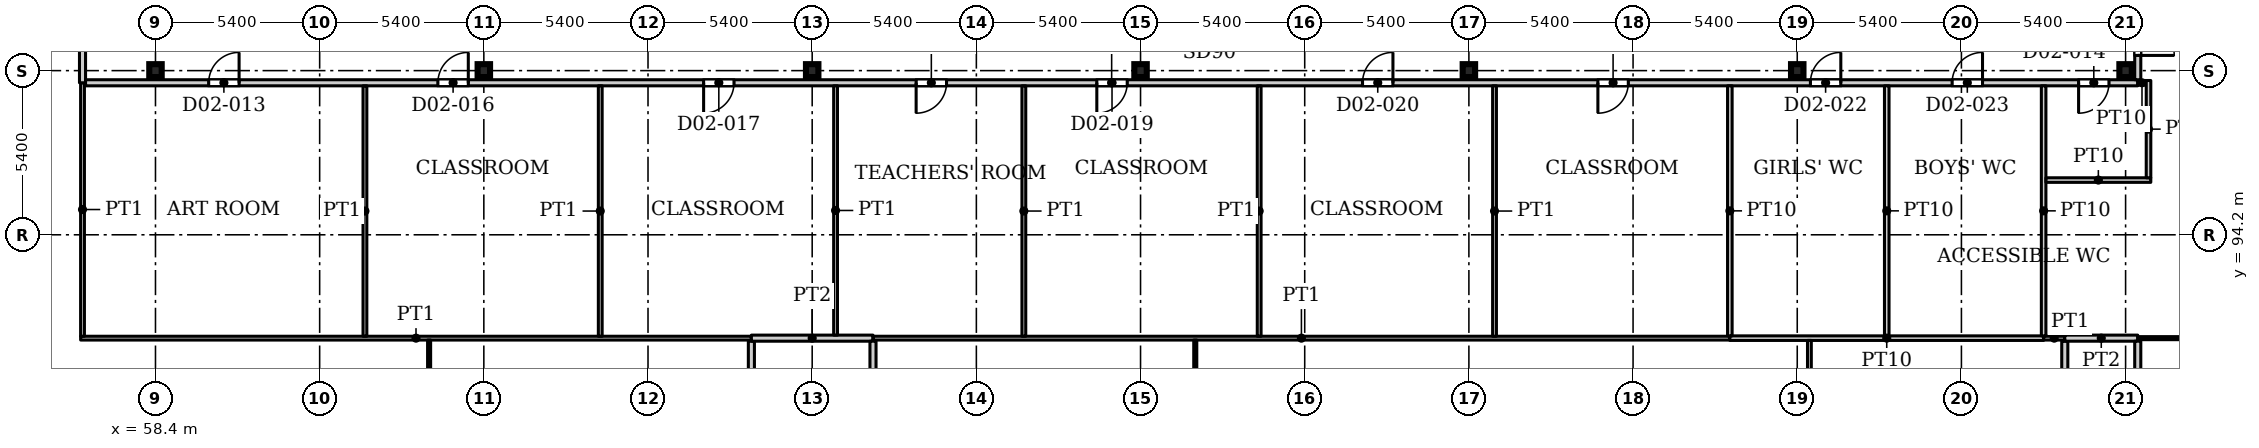
"""IFC4 building model, lengths in metres.
Left out: names, types, materials, properties, quantities, classifications, styles, units other than length and angle.
Written with IfcOpenShell. Run it as: python <this file> out.ifc"""

import sys

from ifc_helpers import new_model, si_unit, direction, frame, frame_2d, origin, origin_2d, place, context, subcontext, project, spatial, rectangle, i_section, extrude, source, transform, mapped, element, fill, save


model = new_model("IFC4")
c1 = context("Model", 3, precision=1e-05, world=origin(), true_north=direction((0.0, 1.0)))
c2 = subcontext(c1, "Body", "Model", "MODEL_VIEW")
j1 = project(units=[si_unit("LENGTHUNIT", "METRE"), si_unit("PLANEANGLEUNIT", "RADIAN")], contexts=[c1])
p1 = place(None, origin())
s1 = spatial("IfcSite", under=j1, at=p1, CompositionType="ELEMENT")
p2 = place(p1, origin())
s2 = spatial("IfcBuilding", under=s1, at=p2, CompositionType="ELEMENT")
p3 = place(p2, frame((0.0, 0.0, 12.5)))
s3 = spatial("IfcBuildingStorey", under=s2, at=p3, CompositionType="ELEMENT", Elevation=12.5)
for number, where, z_axis, x_axis in (
    (1, (58.4, 99.6, 0.0), (0.0, 0.0, 1.0), (1.0, 0.0, 0.0)),
    (2, (69.2, 99.6, 0.0), (0.0, 0.0, 1.0), (1.0, 0.0, 0.0)),
    (3, (80.0, 99.6, 0.0), (0.0, 0.0, 1.0), (1.0, 0.0, 0.0)),
    (4, (90.8, 99.6, 0.0), (0.0, 0.0, 1.0), (1.0, 0.0, 0.0)),
    (5, (101.6, 99.6, 0.0), (0.0, 0.0, 1.0), (1.0, 0.0, 0.0)),
    (6, (112.4, 99.6, 0.0), (0.0, 0.0, 1.0), (1.0, 0.0, 0.0)),
    (7, (123.2, 99.6, 0.0), (0.0, 0.0, 1.0), (1.0, 0.0, 0.0)),
):
    element("IfcColumn", number, at=place(p3, frame(where, z_axis=z_axis, x_axis=x_axis)), inside=s3, PredefinedType="COLUMN", context=c2, shape_type="SweptSolid", body=[
        extrude(i_section(OverallWidth=0.409, OverallDepth=0.425, WebThickness=0.033, FlangeThickness=0.052, FilletRadius=0.013, at=origin_2d()), origin(), (0.0, 0.0, 1.0), 4.5),
    ])
p4 = place(p3, frame((55.938, 90.8, 0.0), z_axis=(0.0, 0.0, 1.0), x_axis=(1.0, 0.0, 0.0)))
e8 = element("IfcWall", 8, at=p4, inside=s3, PredefinedType="PARTITIONING", context=c2, shape_type="SweptSolid", body=[
    extrude(rectangle(XDim=22.062, YDim=0.125, at=frame_2d((11.031, 0.0))), origin(), (0.0, 0.0, 1.0), 4.18),
])
p5 = place(p3, frame((56.0, 90.862, 0.0), z_axis=(0.0, 0.0, 1.0), x_axis=(0.0, 1.0, 0.0)))
e9 = element("IfcWall", 9, at=p5, inside=s3, PredefinedType="PARTITIONING", context=c2, shape_type="SweptSolid", body=[
    extrude(rectangle(XDim=8.338, YDim=0.125, at=frame_2d((4.169, 0.0))), origin(), (0.0, 0.0, 1.0), 4.18),
])
p6 = place(p3, frame((56.0, 99.2, 0.0), z_axis=(0.0, 0.0, 1.0), x_axis=(0.0, 1.0, 0.0)))
e10 = element("IfcWall", 10, at=p6, inside=s3, PredefinedType="PARTITIONING", context=c2, shape_type="SweptSolid", body=[
    extrude(rectangle(XDim=2.4, YDim=0.2, at=frame_2d((1.2, 0.0))), origin(), (0.0, 0.0, 1.0), 4.18),
])
p7 = place(p3, frame((56.1, 99.2, 0.0), z_axis=(0.0, 0.0, 1.0), x_axis=(1.0, 0.0, 0.0)))
e11 = element("IfcWall", 11, at=p7, inside=s3, PredefinedType="PARTITIONING", context=c2, shape_type="SweptSolid", body=[
    extrude(rectangle(XDim=67.5, YDim=0.2, at=frame_2d((33.75, 0.0))), origin(), (0.0, 0.0, 1.0), 4.18),
])
p8 = place(p7, frame((4.05, 0.0, 0.0)))
e12 = element("IfcOpeningElement", 12, at=p8, cuts=e11, PredefinedType="OPENING", context=c2, shape_type="SweptSolid", body=[
    extrude(rectangle(XDim=1.0, YDim=2.1, at=frame_2d((0.5, 1.05))), frame((0.0, 0.11, 0.0), z_axis=(0.0, -1.0, 0.0), x_axis=(1.0, 0.0, 0.0)), (0.0, 0.0, 1.0), 0.22),
])
p9 = place(p7, frame((65.554, 0.0, 0.0)))
e13 = element("IfcOpeningElement", 13, at=p9, cuts=e11, PredefinedType="OPENING", context=c2, shape_type="SweptSolid", body=[
    extrude(rectangle(XDim=1.0, YDim=2.1, at=frame_2d((0.5, 1.05))), frame((0.0, 0.11, 0.0), z_axis=(0.0, -1.0, 0.0), x_axis=(1.0, 0.0, 0.0)), (0.0, 0.0, 1.0), 0.22),
])
p10 = place(p7, frame((11.589, 0.0, 0.0)))
e14 = element("IfcOpeningElement", 14, at=p10, cuts=e11, PredefinedType="OPENING", context=c2, shape_type="SweptSolid", body=[
    extrude(rectangle(XDim=1.0, YDim=2.1, at=frame_2d((0.5, 1.05))), frame((0.0, 0.11, 0.0), z_axis=(0.0, -1.0, 0.0), x_axis=(1.0, 0.0, 0.0)), (0.0, 0.0, 1.0), 0.22),
])
p11 = place(p7, frame((20.329, 0.0, 0.0)))
e15 = element("IfcOpeningElement", 15, at=p11, cuts=e11, PredefinedType="OPENING", context=c2, shape_type="SweptSolid", body=[
    extrude(rectangle(XDim=1.0, YDim=2.1, at=frame_2d((0.5, 1.05))), frame((0.0, 0.11, 0.0), z_axis=(0.0, -1.0, 0.0), x_axis=(1.0, 0.0, 0.0)), (0.0, 0.0, 1.0), 0.22),
])
p12 = place(p7, frame((27.319, 0.0, 0.0)))
e16 = element("IfcOpeningElement", 16, at=p12, cuts=e11, PredefinedType="OPENING", context=c2, shape_type="SweptSolid", body=[
    extrude(rectangle(XDim=1.0, YDim=2.1, at=frame_2d((0.5, 1.05))), frame((0.0, 0.11, 0.0), z_axis=(0.0, -1.0, 0.0), x_axis=(1.0, 0.0, 0.0)), (0.0, 0.0, 1.0), 0.22),
])
p13 = place(p7, frame((33.262, 0.0, 0.0)))
e17 = element("IfcOpeningElement", 17, at=p13, cuts=e11, PredefinedType="OPENING", context=c2, shape_type="SweptSolid", body=[
    extrude(rectangle(XDim=1.0, YDim=2.1, at=frame_2d((0.5, 1.05))), frame((0.0, 0.11, 0.0), z_axis=(0.0, -1.0, 0.0), x_axis=(1.0, 0.0, 0.0)), (0.0, 0.0, 1.0), 0.22),
])
p14 = place(p7, frame((42.002, 0.0, 0.0)))
e18 = element("IfcOpeningElement", 18, at=p14, cuts=e11, PredefinedType="OPENING", context=c2, shape_type="SweptSolid", body=[
    extrude(rectangle(XDim=1.0, YDim=2.1, at=frame_2d((0.5, 1.05))), frame((0.0, 0.11, 0.0), z_axis=(0.0, -1.0, 0.0), x_axis=(1.0, 0.0, 0.0)), (0.0, 0.0, 1.0), 0.22),
])
p15 = place(p7, frame((49.743, 0.0, 0.0)))
e19 = element("IfcOpeningElement", 19, at=p15, cuts=e11, PredefinedType="OPENING", context=c2, shape_type="SweptSolid", body=[
    extrude(rectangle(XDim=1.0, YDim=2.1, at=frame_2d((0.5, 1.05))), frame((0.0, 0.11, 0.0), z_axis=(0.0, -1.0, 0.0), x_axis=(1.0, 0.0, 0.0)), (0.0, 0.0, 1.0), 0.22),
])
p16 = place(p7, frame((56.733, 0.0, 0.0)))
e20 = element("IfcOpeningElement", 20, at=p16, cuts=e11, PredefinedType="OPENING", context=c2, shape_type="SweptSolid", body=[
    extrude(rectangle(XDim=1.0, YDim=2.1, at=frame_2d((0.5, 1.05))), frame((0.0, 0.11, 0.0), z_axis=(0.0, -1.0, 0.0), x_axis=(1.0, 0.0, 0.0)), (0.0, 0.0, 1.0), 0.22),
])
p17 = place(p7, frame((61.394, 0.0, 0.0)))
e21 = element("IfcOpeningElement", 21, at=p17, cuts=e11, PredefinedType="OPENING", context=c2, shape_type="SweptSolid", body=[
    extrude(rectangle(XDim=1.0, YDim=2.1, at=frame_2d((0.5, 1.05))), frame((0.0, 0.11, 0.0), z_axis=(0.0, -1.0, 0.0), x_axis=(1.0, 0.0, 0.0)), (0.0, 0.0, 1.0), 0.22),
])
p18 = place(p3, frame((65.289, 90.862, 0.0), z_axis=(0.0, 0.0, 1.0), x_axis=(0.0, 1.0, 0.0)))
e22 = element("IfcWall", 22, at=p18, inside=s3, PredefinedType="PARTITIONING", context=c2, shape_type="SweptSolid", body=[
    extrude(rectangle(XDim=8.238, YDim=0.125, at=frame_2d((4.119, 0.0))), origin(), (0.0, 0.0, 1.0), 4.18),
])
p19 = place(p3, frame((67.4, 69.0, 0.0), z_axis=(0.0, 0.0, 1.0), x_axis=(0.0, 1.0, 0.0)))
e23 = element("IfcWall", 23, at=p19, inside=s3, PredefinedType="PARTITIONING", context=c2, shape_type="SweptSolid", body=[
    extrude(rectangle(XDim=21.738, YDim=0.1, at=frame_2d((10.869, 0.0))), origin(), (0.0, 0.0, 1.0), 4.18),
])
p20 = place(p3, frame((73.029, 90.862, 0.0), z_axis=(0.0, 0.0, 1.0), x_axis=(0.0, 1.0, 0.0)))
e24 = element("IfcWall", 24, at=p20, inside=s3, PredefinedType="PARTITIONING", context=c2, shape_type="SweptSolid", body=[
    extrude(rectangle(XDim=8.238, YDim=0.125, at=frame_2d((4.119, 0.0))), origin(), (0.0, 0.0, 1.0), 4.18),
])
p21 = place(p3, frame((78.0, 69.1, 0.0), z_axis=(0.0, 0.0, 1.0), x_axis=(0.0, 1.0, 0.0)))
e25 = element("IfcWall", 25, at=p21, inside=s3, PredefinedType="PARTITIONING", context=c2, shape_type="SweptSolid", body=[
    extrude(rectangle(XDim=21.6, YDim=0.2, at=frame_2d((10.8, 0.0))), origin(), (0.0, 0.0, 1.0), 4.18),
])
p22 = place(p3, frame((78.0, 90.8, 0.0), z_axis=(0.0, 0.0, 1.0), x_axis=(1.0, 0.0, 0.0)))
e26 = element("IfcWall", 26, at=p22, inside=s3, PredefinedType="PARTITIONING", context=c2, shape_type="SweptSolid", body=[
    extrude(rectangle(XDim=4.0, YDim=0.2, at=frame_2d((2.0, 0.0))), origin(), (0.0, 0.0, 1.0), 4.18),
])
p23 = place(p3, frame((80.769, 90.9, 0.0), z_axis=(0.0, 0.0, 1.0), x_axis=(0.0, 1.0, 0.0)))
e27 = element("IfcWall", 27, at=p23, inside=s3, PredefinedType="PARTITIONING", context=c2, shape_type="SweptSolid", body=[
    extrude(rectangle(XDim=8.2, YDim=0.125, at=frame_2d((4.1, 0.0))), origin(), (0.0, 0.0, 1.0), 4.18),
])
p24 = place(p3, frame((82.0, 69.1, 0.0), z_axis=(0.0, 0.0, 1.0), x_axis=(0.0, 1.0, 0.0)))
e28 = element("IfcWall", 28, at=p24, inside=s3, PredefinedType="PARTITIONING", context=c2, shape_type="SweptSolid", body=[
    extrude(rectangle(XDim=21.6, YDim=0.2, at=frame_2d((10.8, 0.0))), origin(), (0.0, 0.0, 1.0), 4.18),
])
p25 = place(p3, frame((82.0, 90.8, 0.0), z_axis=(0.0, 0.0, 1.0), x_axis=(1.0, 0.0, 0.0)))
e29 = element("IfcWall", 29, at=p25, inside=s3, PredefinedType="PARTITIONING", context=c2, shape_type="SweptSolid", body=[
    extrude(rectangle(XDim=28.183, YDim=0.125, at=frame_2d((14.092, 0.0))), origin(), (0.0, 0.0, 1.0), 4.18),
])
p26 = place(p3, frame((86.962, 90.862, 0.0), z_axis=(0.0, 0.0, 1.0), x_axis=(0.0, 1.0, 0.0)))
e30 = element("IfcWall", 30, at=p26, inside=s3, PredefinedType="PARTITIONING", context=c2, shape_type="SweptSolid", body=[
    extrude(rectangle(XDim=8.238, YDim=0.125, at=frame_2d((4.119, 0.0))), origin(), (0.0, 0.0, 1.0), 4.18),
])
p27 = place(p3, frame((92.6, 69.0, 0.0), z_axis=(0.0, 0.0, 1.0), x_axis=(0.0, 1.0, 0.0)))
e31 = element("IfcWall", 31, at=p27, inside=s3, PredefinedType="PARTITIONING", context=c2, shape_type="SweptSolid", body=[
    extrude(rectangle(XDim=21.738, YDim=0.1, at=frame_2d((10.869, 0.0))), origin(), (0.0, 0.0, 1.0), 4.18),
])
for number, where, z_axis, x_axis in (
    (32, (94.702, 90.862, 0.0), (0.0, 0.0, 1.0), (0.0, 1.0, 0.0)),
    (33, (102.443, 90.862, 0.0), (0.0, 0.0, 1.0), (0.0, 1.0, 0.0)),
):
    element("IfcWall", number, at=place(p3, frame(where, z_axis=z_axis, x_axis=x_axis)), inside=s3, PredefinedType="PARTITIONING", context=c2, shape_type="SweptSolid", body=[
        extrude(rectangle(XDim=8.238, YDim=0.125, at=frame_2d((4.119, 0.0))), origin(), (0.0, 0.0, 1.0), 4.18),
    ])
p28 = place(p3, frame((110.183, 90.8, 0.0), z_axis=(0.0, 0.0, 1.0), x_axis=(1.0, 0.0, 0.0)))
e34 = element("IfcWall", 34, at=p28, inside=s3, PredefinedType="PARTITIONING", context=c2, shape_type="SweptSolid", body=[
    extrude(rectangle(XDim=10.321, YDim=0.15, at=frame_2d((5.16, 0.0))), origin(), (0.0, 0.0, 1.0), 4.18),
])
p29 = place(p3, frame((110.183, 90.875, 0.0), z_axis=(0.0, 0.0, 1.0), x_axis=(0.0, 1.0, 0.0)))
e35 = element("IfcWall", 35, at=p29, inside=s3, PredefinedType="PARTITIONING", context=c2, shape_type="SweptSolid", body=[
    extrude(rectangle(XDim=8.225, YDim=0.15, at=frame_2d((4.113, 0.0))), origin(), (0.0, 0.0, 1.0), 4.18),
])
p30 = place(p3, frame((112.8, 43.938, 0.0), z_axis=(0.0, 0.0, 1.0), x_axis=(0.0, 1.0, 0.0)))
e36 = element("IfcWall", 36, at=p30, inside=s3, PredefinedType="PARTITIONING", context=c2, shape_type="SweptSolid", body=[
    extrude(rectangle(XDim=46.787, YDim=0.125, at=frame_2d((23.394, 0.0))), origin(), (0.0, 0.0, 1.0), 4.18),
])
p31 = place(p3, frame((115.344, 90.875, 0.0), z_axis=(0.0, 0.0, 1.0), x_axis=(0.0, 1.0, 0.0)))
e37 = element("IfcWall", 37, at=p31, inside=s3, PredefinedType="PARTITIONING", context=c2, shape_type="SweptSolid", body=[
    extrude(rectangle(XDim=8.225, YDim=0.15, at=frame_2d((4.113, 0.0))), origin(), (0.0, 0.0, 1.0), 4.18),
])
p32 = place(p3, frame((120.504, 90.8, 0.0), z_axis=(0.0, 0.0, 1.0), x_axis=(1.0, 0.0, 0.0)))
e38 = element("IfcWall", 38, at=p32, inside=s3, PredefinedType="PARTITIONING", context=c2, shape_type="SweptSolid", body=[
    extrude(rectangle(XDim=0.696, YDim=0.125, at=frame_2d((0.348, 0.0))), origin(), (0.0, 0.0, 1.0), 4.18),
])
p33 = place(p3, frame((120.504, 90.875, 0.0), z_axis=(0.0, 0.0, 1.0), x_axis=(0.0, 1.0, 0.0)))
e39 = element("IfcWall", 39, at=p33, inside=s3, PredefinedType="PARTITIONING", context=c2, shape_type="SweptSolid", body=[
    extrude(rectangle(XDim=8.225, YDim=0.15, at=frame_2d((4.113, 0.0))), origin(), (0.0, 0.0, 1.0), 4.18),
])
p34 = place(p3, frame((120.579, 96.0, 0.0), z_axis=(0.0, 0.0, 1.0), x_axis=(1.0, 0.0, 0.0)))
e40 = element("IfcWall", 40, at=p34, inside=s3, PredefinedType="PARTITIONING", context=c2, shape_type="SweptSolid", body=[
    extrude(rectangle(XDim=3.45, YDim=0.15, at=frame_2d((1.725, 0.0))), origin(), (0.0, 0.0, 1.0), 4.18),
])
p35 = place(p3, frame((121.2, 74.6, 0.0), z_axis=(0.0, 0.0, 1.0), x_axis=(0.0, 1.0, 0.0)))
e41 = element("IfcWall", 41, at=p35, inside=s3, PredefinedType="PARTITIONING", context=c2, shape_type="SweptSolid", body=[
    extrude(rectangle(XDim=16.1, YDim=0.2, at=frame_2d((8.05, 0.0))), origin(), (0.0, 0.0, 1.0), 4.18),
])
p36 = place(p35, frame((3.987, 0.0, 0.0)))
e42 = element("IfcOpeningElement", 42, at=p36, cuts=e41, PredefinedType="OPENING", context=c2, shape_type="SweptSolid", body=[
    extrude(rectangle(XDim=1.0, YDim=2.1, at=frame_2d((0.5, 1.05))), frame((0.0, 0.11, 0.0), z_axis=(0.0, -1.0, 0.0), x_axis=(1.0, 0.0, 0.0)), (0.0, 0.0, 1.0), 0.22),
])
p37 = place(p35, frame((12.05, 0.0, 0.0)))
e43 = element("IfcOpeningElement", 43, at=p37, cuts=e41, PredefinedType="OPENING", context=c2, shape_type="SweptSolid", body=[
    extrude(rectangle(XDim=1.0, YDim=2.1, at=frame_2d((0.5, 1.05))), frame((0.0, 0.11, 0.0), z_axis=(0.0, -1.0, 0.0), x_axis=(1.0, 0.0, 0.0)), (0.0, 0.0, 1.0), 0.22),
])
p38 = place(p3, frame((121.2, 90.8, 0.0), z_axis=(0.0, 0.0, 1.0), x_axis=(1.0, 0.0, 0.0)))
e44 = element("IfcWall", 44, at=p38, inside=s3, PredefinedType="PARTITIONING", context=c2, shape_type="SweptSolid", body=[
    extrude(rectangle(XDim=2.4, YDim=0.2, at=frame_2d((1.2, 0.0))), origin(), (0.0, 0.0, 1.0), 4.18),
])
p39 = place(p3, frame((123.6, 69.15, 0.0), z_axis=(0.0, 0.0, 1.0), x_axis=(0.0, 1.0, 0.0)))
e45 = element("IfcWall", 45, at=p39, inside=s3, PredefinedType="PARTITIONING", context=c2, shape_type="SweptSolid", body=[
    extrude(rectangle(XDim=21.55, YDim=0.2, at=frame_2d((10.775, 0.0))), origin(), (0.0, 0.0, 1.0), 4.18),
])
p40 = place(p39, frame((4.4, 0.0, 0.0)))
e46 = element("IfcOpeningElement", 46, at=p40, cuts=e45, PredefinedType="OPENING", context=c2, shape_type="SweptSolid", body=[
    extrude(rectangle(XDim=1.0, YDim=2.1, at=frame_2d((0.5, 1.05))), frame((0.0, 0.11, 0.0), z_axis=(0.0, -1.0, 0.0), x_axis=(1.0, 0.0, 0.0)), (0.0, 0.0, 1.0), 0.22),
])
p41 = place(p39, frame((15.238, 0.0, 0.0)))
e47 = element("IfcOpeningElement", 47, at=p41, cuts=e45, PredefinedType="OPENING", context=c2, shape_type="SweptSolid", body=[
    extrude(rectangle(XDim=1.0, YDim=2.1, at=frame_2d((0.5, 1.05))), frame((0.0, 0.11, 0.0), z_axis=(0.0, -1.0, 0.0), x_axis=(1.0, 0.0, 0.0)), (0.0, 0.0, 1.0), 0.22),
])
p42 = place(p39, frame((11.238, 0.0, 0.0)))
e48 = element("IfcOpeningElement", 48, at=p42, cuts=e45, PredefinedType="OPENING", context=c2, shape_type="SweptSolid", body=[
    extrude(rectangle(XDim=1.2, YDim=2.1, at=frame_2d((0.6, 1.05))), frame((0.0, 0.11, 0.0), z_axis=(0.0, -1.0, 0.0), x_axis=(1.0, 0.0, 0.0)), (0.0, 0.0, 1.0), 0.22),
])
p43 = place(p3, frame((123.6, 90.8, 0.0), z_axis=(0.0, 0.0, 1.0), x_axis=(1.0, 0.0, 0.0)))
e49 = element("IfcWall", 49, at=p43, inside=s3, PredefinedType="PARTITIONING", context=c2, shape_type="SweptSolid", body=[
    extrude(rectangle(XDim=8.4, YDim=0.1, at=frame_2d((4.2, 0.0))), origin(), (0.0, 0.0, 1.0), 4.18),
])
p44 = place(p3, frame((123.6, 99.2, 0.0), z_axis=(0.0, 0.0, 1.0), x_axis=(1.0, 0.0, 0.0)))
e50 = element("IfcWall", 50, at=p44, inside=s3, PredefinedType="PARTITIONING", context=c2, shape_type="SweptSolid", body=[
    extrude(rectangle(XDim=0.279, YDim=0.15, at=frame_2d((0.139, 0.0))), origin(), (0.0, 0.0, 1.0), 4.18),
])
p45 = place(p3, frame((123.6, 99.3, 0.0), z_axis=(0.0, 0.0, 1.0), x_axis=(0.0, 1.0, 0.0)))
e51 = element("IfcWall", 51, at=p45, inside=s3, PredefinedType="PARTITIONING", context=c2, shape_type="SweptSolid", body=[
    extrude(rectangle(XDim=2.3, YDim=0.2, at=frame_2d((1.15, 0.0))), origin(), (0.0, 0.0, 1.0), 4.18),
])
p46 = place(p45, frame((0.8, 0.0, 0.0)))
e52 = element("IfcOpeningElement", 52, at=p46, cuts=e51, PredefinedType="OPENING", context=c2, shape_type="SweptSolid", body=[
    extrude(rectangle(XDim=1.2, YDim=2.1, at=frame_2d((0.6, 1.05))), frame((0.0, 0.11, 0.0), z_axis=(0.0, -1.0, 0.0), x_axis=(1.0, 0.0, 0.0)), (0.0, 0.0, 1.0), 0.22),
])
p47 = place(p3, frame((123.954, 96.075, 0.0), z_axis=(0.0, 0.0, 1.0), x_axis=(0.0, 1.0, 0.0)))
e53 = element("IfcWall", 53, at=p47, inside=s3, PredefinedType="PARTITIONING", context=c2, shape_type="SweptSolid", body=[
    extrude(rectangle(XDim=3.2, YDim=0.15, at=frame_2d((1.6, 0.0))), origin(), (0.0, 0.0, 1.0), 4.18),
])
m1 = source(origin(), c2, "Body", "SweptSolid", [
    extrude(rectangle(XDim=1.0, YDim=2.1, at=frame_2d((0.5, 1.05))), frame((0.0, 0.025, 0.0), z_axis=(0.0, -1.0, 0.0), x_axis=(1.0, 0.0, 0.0)), (0.0, 0.0, 1.0), 0.05),
])
p48 = place(p8, origin())
e54 = element("IfcDoor", 54, at=p48, inside=s3, OperationType="SINGLE_SWING_LEFT", PredefinedType="DOOR", context=c2, shape_type="MappedRepresentation", body=[
    mapped(m1, transform((0.0, 0.0, 0.0), x_axis=(1.0, 0.0, 0.0), y_axis=(0.0, 1.0, 0.0), z_axis=(0.0, 0.0, 1.0), scale=1.0)),
])
fill(e12, e54)
p49 = place(p9, origin())
e55 = element("IfcDoor", 55, at=p49, inside=s3, OperationType="SINGLE_SWING_RIGHT", PredefinedType="DOOR", context=c2, shape_type="MappedRepresentation", body=[
    mapped(m1, transform((0.0, 0.0, 0.0), x_axis=(1.0, 0.0, 0.0), y_axis=(0.0, 1.0, 0.0), z_axis=(0.0, 0.0, 1.0), scale=1.0)),
])
fill(e13, e55)
m2 = source(origin(), c2, "Body", "SweptSolid", [
    extrude(rectangle(XDim=1.2, YDim=2.1, at=frame_2d((0.6, 1.05))), frame((0.0, 0.025, 0.0), z_axis=(0.0, -1.0, 0.0), x_axis=(1.0, 0.0, 0.0)), (0.0, 0.0, 1.0), 0.05),
])
p50 = place(p46, origin())
e56 = element("IfcDoor", 56, at=p50, inside=s3, OperationType="SINGLE_SWING_RIGHT", PredefinedType="DOOR", context=c2, shape_type="MappedRepresentation", body=[
    mapped(m2, transform((0.0, 0.0, 0.0), x_axis=(1.0, 0.0, 0.0), y_axis=(0.0, 1.0, 0.0), z_axis=(0.0, 0.0, 1.0), scale=1.0)),
])
fill(e52, e56)
p51 = place(p10, origin())
e57 = element("IfcDoor", 57, at=p51, inside=s3, OperationType="SINGLE_SWING_LEFT", PredefinedType="DOOR", context=c2, shape_type="MappedRepresentation", body=[
    mapped(m1, transform((0.0, 0.0, 0.0), x_axis=(1.0, 0.0, 0.0), y_axis=(0.0, 1.0, 0.0), z_axis=(0.0, 0.0, 1.0), scale=1.0)),
])
fill(e14, e57)
p52 = place(p11, origin())
e58 = element("IfcDoor", 58, at=p52, inside=s3, OperationType="SINGLE_SWING_RIGHT", PredefinedType="DOOR", context=c2, shape_type="MappedRepresentation", body=[
    mapped(m1, transform((0.0, 0.0, 0.0), x_axis=(1.0, 0.0, 0.0), y_axis=(0.0, 1.0, 0.0), z_axis=(0.0, 0.0, 1.0), scale=1.0)),
])
fill(e15, e58)
p53 = place(p12, origin())
e59 = element("IfcDoor", 59, at=p53, inside=s3, OperationType="SINGLE_SWING_RIGHT", PredefinedType="DOOR", context=c2, shape_type="MappedRepresentation", body=[
    mapped(m1, transform((0.0, 0.0, 0.0), x_axis=(1.0, 0.0, 0.0), y_axis=(0.0, 1.0, 0.0), z_axis=(0.0, 0.0, 1.0), scale=1.0)),
])
fill(e16, e59)
p54 = place(p13, origin())
e60 = element("IfcDoor", 60, at=p54, inside=s3, OperationType="SINGLE_SWING_RIGHT", PredefinedType="DOOR", context=c2, shape_type="MappedRepresentation", body=[
    mapped(m1, transform((0.0, 0.0, 0.0), x_axis=(1.0, 0.0, 0.0), y_axis=(0.0, 1.0, 0.0), z_axis=(0.0, 0.0, 1.0), scale=1.0)),
])
fill(e17, e60)
p55 = place(p14, origin())
e61 = element("IfcDoor", 61, at=p55, inside=s3, OperationType="SINGLE_SWING_LEFT", PredefinedType="DOOR", context=c2, shape_type="MappedRepresentation", body=[
    mapped(m1, transform((0.0, 0.0, 0.0), x_axis=(1.0, 0.0, 0.0), y_axis=(0.0, 1.0, 0.0), z_axis=(0.0, 0.0, 1.0), scale=1.0)),
])
fill(e18, e61)
p56 = place(p15, origin())
e62 = element("IfcDoor", 62, at=p56, inside=s3, OperationType="SINGLE_SWING_RIGHT", PredefinedType="DOOR", context=c2, shape_type="MappedRepresentation", body=[
    mapped(m1, transform((0.0, 0.0, 0.0), x_axis=(1.0, 0.0, 0.0), y_axis=(0.0, 1.0, 0.0), z_axis=(0.0, 0.0, 1.0), scale=1.0)),
])
fill(e19, e62)
p57 = place(p16, origin())
e63 = element("IfcDoor", 63, at=p57, inside=s3, OperationType="SINGLE_SWING_LEFT", PredefinedType="DOOR", context=c2, shape_type="MappedRepresentation", body=[
    mapped(m1, transform((0.0, 0.0, 0.0), x_axis=(1.0, 0.0, 0.0), y_axis=(0.0, 1.0, 0.0), z_axis=(0.0, 0.0, 1.0), scale=1.0)),
])
fill(e20, e63)
p58 = place(p17, origin())
e64 = element("IfcDoor", 64, at=p58, inside=s3, OperationType="SINGLE_SWING_LEFT", PredefinedType="DOOR", context=c2, shape_type="MappedRepresentation", body=[
    mapped(m1, transform((0.0, 0.0, 0.0), x_axis=(1.0, 0.0, 0.0), y_axis=(0.0, 1.0, 0.0), z_axis=(0.0, 0.0, 1.0), scale=1.0)),
])
fill(e21, e64)
save(model, sys.argv[1])
